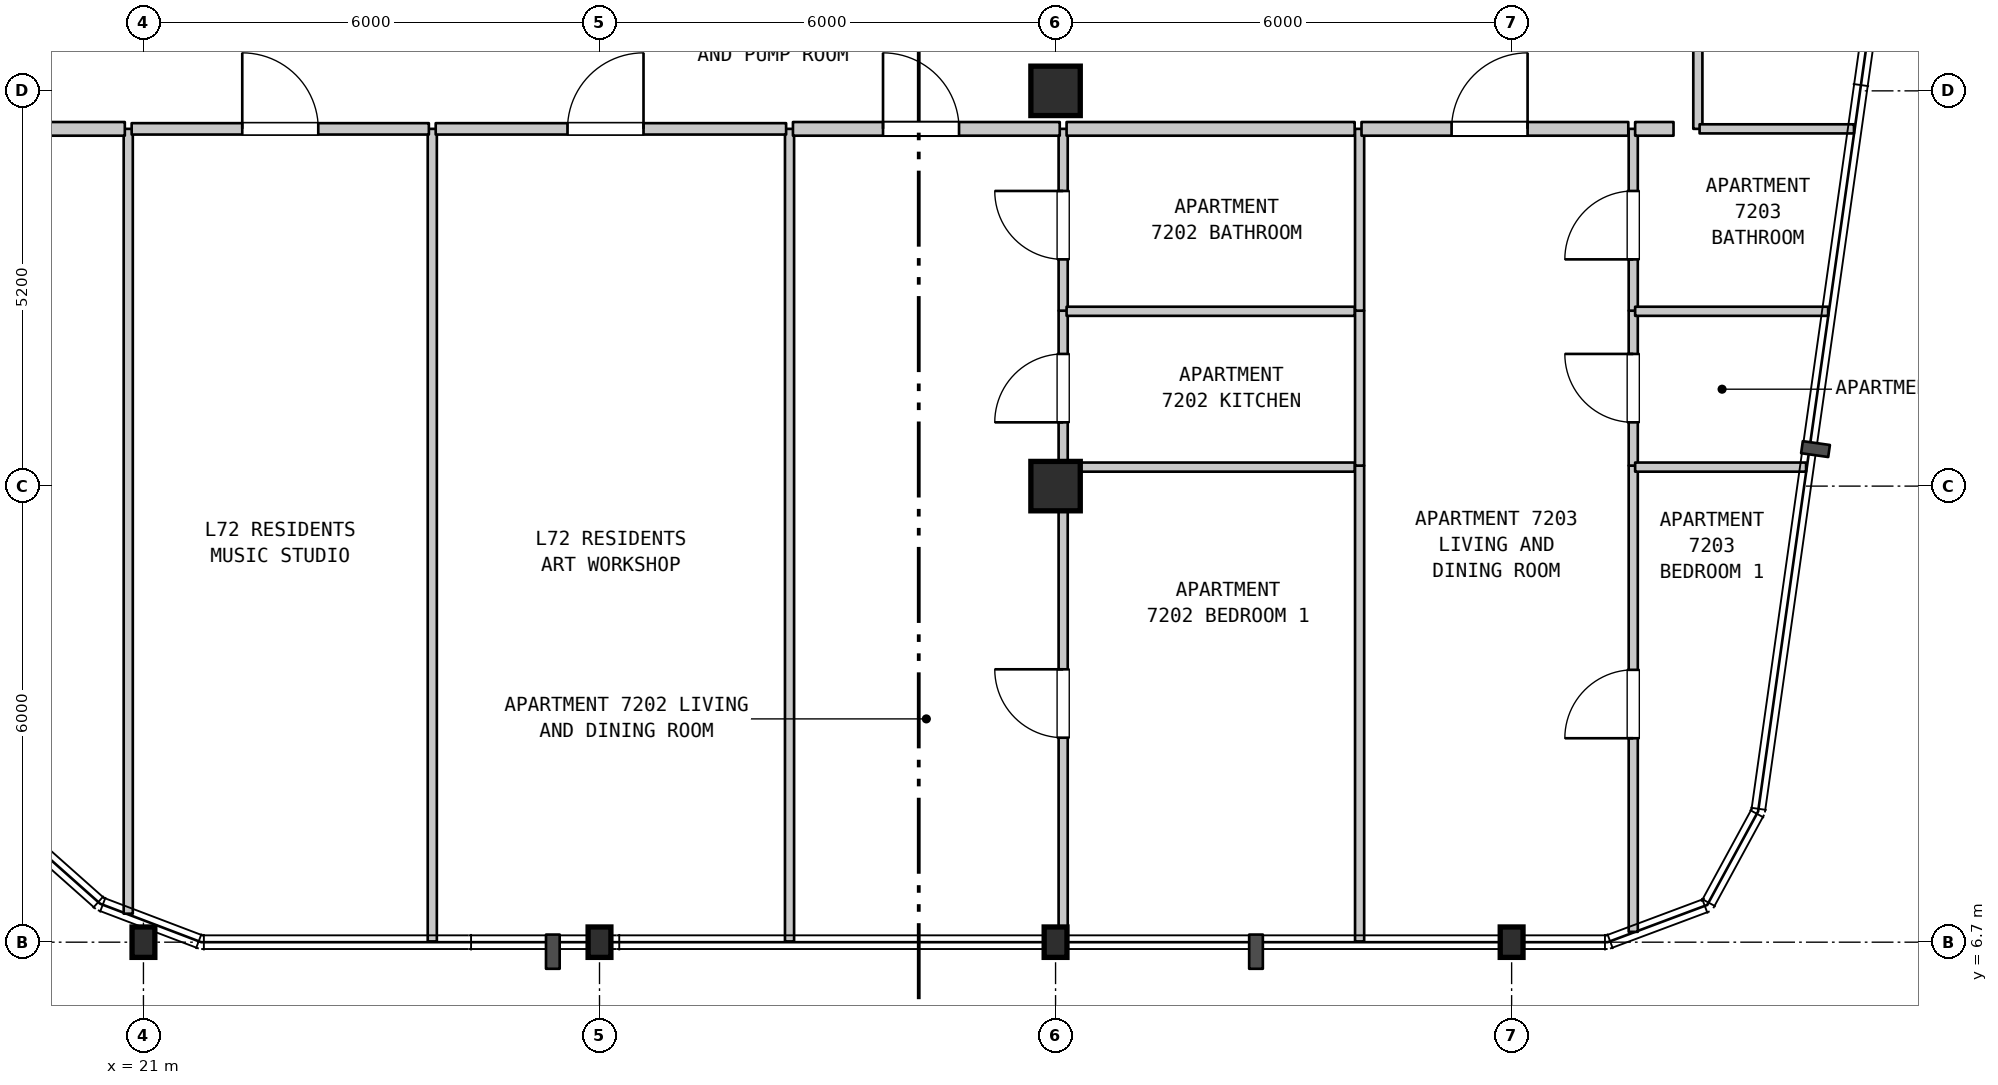
"""IFC4 building model, lengths in metres.
Left out: names, types, materials, properties, quantities, classifications, styles, units other than length and angle.
Written with IfcOpenShell. Run it as: python <this file> out.ifc"""

import sys

from ifc_helpers import new_model, si_unit, direction, frame, frame_2d, origin, origin_2d, place, context, subcontext, project, spatial, rectangle, i_section, extrude, element, fill, save


model = new_model("IFC4")
c1 = context("Model", 3, precision=1e-05, world=origin(), true_north=direction((0.0, 1.0)))
c2 = subcontext(c1, "Body", "Model", "MODEL_VIEW")
j1 = project(units=[si_unit("LENGTHUNIT", "METRE"), si_unit("PLANEANGLEUNIT", "RADIAN")], contexts=[c1])
p1 = place(None, origin())
s1 = spatial("IfcSite", under=j1, at=p1, CompositionType="ELEMENT")
p2 = place(p1, origin())
s2 = spatial("IfcBuilding", under=s1, at=p2, CompositionType="ELEMENT")
p3 = place(p2, frame((0.0, 0.0, 288.0)))
s3 = spatial("IfcBuildingStorey", under=s2, at=p3, CompositionType="ELEMENT", Elevation=288.0)
for number, where, z_axis, x_axis in (
    (1, (21.0, 6.7, 0.0), (0.0, 0.0, 1.0), (1.0, 0.0, 0.0)),
    (2, (27.0, 6.7, 0.0), (0.0, 0.0, 1.0), (1.0, 0.0, 0.0)),
    (3, (33.0, 6.7, 0.0), (0.0, 0.0, 1.0), (1.0, 0.0, 0.0)),
):
    element("IfcColumn", number, at=place(p3, frame(where, z_axis=z_axis, x_axis=x_axis)), inside=s3, PredefinedType="COLUMN", context=c2, shape_type="SweptSolid", body=[
        extrude(i_section(OverallWidth=0.3, OverallDepth=0.4, WebThickness=0.013, FlangeThickness=0.024, FilletRadius=0.027, at=origin_2d()), origin(), (0.0, 0.0, 1.0), 3.7),
    ])
for number, where, z_axis, x_axis in (
    (4, (33.0, 12.7, 0.0), (0.0, 0.0, 1.0), (1.0, 0.0, 0.0)),
    (5, (33.0, 17.9, 0.0), (0.0, 0.0, 1.0), (1.0, 0.0, 0.0)),
):
    element("IfcColumn", number, at=place(p3, frame(where, z_axis=z_axis, x_axis=x_axis)), inside=s3, PredefinedType="COLUMN", context=c2, shape_type="SweptSolid", body=[
        extrude(rectangle(XDim=0.65, YDim=0.65, at=origin_2d()), origin(), (0.0, 0.0, 1.0), 3.7),
    ])
p4 = place(p3, frame((39.0, 6.7, 0.0), z_axis=(0.0, 0.0, 1.0), x_axis=(1.0, 0.0, 0.0)))
e6 = element("IfcColumn", 6, at=p4, inside=s3, PredefinedType="COLUMN", context=c2, shape_type="SweptSolid", body=[
    extrude(i_section(OverallWidth=0.3, OverallDepth=0.4, WebThickness=0.013, FlangeThickness=0.024, FilletRadius=0.027, at=origin_2d()), origin(), (0.0, 0.0, 1.0), 3.7),
])
p5 = place(p3, frame((20.8, 7.075, 0.0), z_axis=(0.0, 0.0, 1.0), x_axis=(0.0, 1.0, 0.0)))
e7 = element("IfcWall", 7, at=p5, inside=s3, PredefinedType="PARTITIONING", context=c2, shape_type="SweptSolid", body=[
    extrude(rectangle(XDim=10.325, YDim=0.12, at=frame_2d((5.163, 0.0))), origin(), (0.0, 0.0, 1.0), 3.39),
])
for number, where, z_axis, x_axis in (
    (8, (24.8, 6.71, 0.0), (0.0, 0.0, 1.0), (0.0, 1.0, 0.0)),
    (9, (29.5, 6.71, 0.0), (0.0, 0.0, 1.0), (0.0, 1.0, 0.0)),
):
    element("IfcWall", number, at=place(p3, frame(where, z_axis=z_axis, x_axis=x_axis)), inside=s3, PredefinedType="PARTITIONING", context=c2, shape_type="SweptSolid", body=[
        extrude(rectangle(XDim=10.69, YDim=0.12, at=frame_2d((5.345, 0.0))), origin(), (0.0, 0.0, 1.0), 3.39),
    ])
p6 = place(p3, frame((33.1, 6.71, 0.0), z_axis=(0.0, 0.0, 1.0), x_axis=(0.0, 1.0, 0.0)))
e10 = element("IfcWall", 10, at=p6, inside=s3, PredefinedType="PARTITIONING", context=c2, shape_type="SweptSolid", body=[
    extrude(rectangle(XDim=6.26, YDim=0.12, at=frame_2d((3.13, 0.0))), origin(), (0.0, 0.0, 1.0), 3.1),
])
p7 = place(p6, frame((2.68, 0.0, 0.0)))
e11 = element("IfcOpeningElement", 11, at=p7, cuts=e10, PredefinedType="OPENING", context=c2, shape_type="SweptSolid", body=[
    extrude(rectangle(XDim=0.9, YDim=2.15, at=frame_2d((0.45, 1.075))), frame((0.0, 0.07, 0.0), z_axis=(0.0, -1.0, 0.0), x_axis=(1.0, 0.0, 0.0)), (0.0, 0.0, 1.0), 0.14),
])
p8 = place(p3, frame((33.1, 12.97, 0.0), z_axis=(0.0, 0.0, 1.0), x_axis=(0.0, 1.0, 0.0)))
e12 = element("IfcWall", 12, at=p8, inside=s3, PredefinedType="PARTITIONING", context=c2, shape_type="SweptSolid", body=[
    extrude(rectangle(XDim=2.038, YDim=0.12, at=frame_2d((1.019, 0.0))), origin(), (0.0, 0.0, 1.0), 3.1),
])
p9 = place(p8, frame((0.569, 0.0, 0.0)))
e13 = element("IfcOpeningElement", 13, at=p9, cuts=e12, PredefinedType="OPENING", context=c2, shape_type="SweptSolid", body=[
    extrude(rectangle(XDim=0.9, YDim=2.15, at=frame_2d((0.45, 1.075))), frame((0.0, 0.07, 0.0), z_axis=(0.0, -1.0, 0.0), x_axis=(1.0, 0.0, 0.0)), (0.0, 0.0, 1.0), 0.14),
])
p10 = place(p3, frame((33.1, 15.008, 0.0), z_axis=(0.0, 0.0, 1.0), x_axis=(0.0, 1.0, 0.0)))
e14 = element("IfcWall", 14, at=p10, inside=s3, PredefinedType="PARTITIONING", context=c2, shape_type="SweptSolid", body=[
    extrude(rectangle(XDim=2.392, YDim=0.12, at=frame_2d((1.196, 0.0))), origin(), (0.0, 0.0, 1.0), 3.1),
])
p11 = place(p10, frame((0.675, 0.0, 0.0)))
e15 = element("IfcOpeningElement", 15, at=p11, cuts=e14, PredefinedType="OPENING", context=c2, shape_type="SweptSolid", body=[
    extrude(rectangle(XDim=0.9, YDim=2.1, at=frame_2d((0.45, 1.05))), frame((0.0, 0.07, 0.0), z_axis=(0.0, -1.0, 0.0), x_axis=(1.0, 0.0, 0.0)), (0.0, 0.0, 1.0), 0.14),
])
p12 = place(p3, frame((37.0, 6.71, 0.0), z_axis=(0.0, 0.0, 1.0), x_axis=(0.0, 1.0, 0.0)))
e16 = element("IfcWall", 16, at=p12, inside=s3, PredefinedType="PARTITIONING", context=c2, shape_type="SweptSolid", body=[
    extrude(rectangle(XDim=6.26, YDim=0.12, at=frame_2d((3.13, 0.0))), origin(), (0.0, 0.0, 1.0), 3.39),
])
p13 = place(p3, frame((37.0, 12.97, 0.0), z_axis=(0.0, 0.0, 1.0), x_axis=(0.0, 1.0, 0.0)))
e17 = element("IfcWall", 17, at=p13, inside=s3, PredefinedType="PARTITIONING", context=c2, shape_type="SweptSolid", body=[
    extrude(rectangle(XDim=2.038, YDim=0.12, at=frame_2d((1.019, 0.0))), origin(), (0.0, 0.0, 1.0), 3.39),
])
p14 = place(p3, frame((37.0, 15.008, 0.0), z_axis=(0.0, 0.0, 1.0), x_axis=(0.0, 1.0, 0.0)))
e18 = element("IfcWall", 18, at=p14, inside=s3, PredefinedType="PARTITIONING", context=c2, shape_type="SweptSolid", body=[
    extrude(rectangle(XDim=2.392, YDim=0.12, at=frame_2d((1.196, 0.0))), origin(), (0.0, 0.0, 1.0), 3.39),
])
p15 = place(p3, frame((40.6, 6.836, 0.0), z_axis=(0.0, 0.0, 1.0), x_axis=(0.0, 1.0, 0.0)))
e19 = element("IfcWall", 19, at=p15, inside=s3, PredefinedType="PARTITIONING", context=c2, shape_type="SweptSolid", body=[
    extrude(rectangle(XDim=6.134, YDim=0.12, at=frame_2d((3.067, 0.0))), origin(), (0.0, 0.0, 1.0), 3.39),
])
p16 = place(p15, frame((2.547, 0.0, 0.0)))
e20 = element("IfcOpeningElement", 20, at=p16, cuts=e19, PredefinedType="OPENING", context=c2, shape_type="SweptSolid", body=[
    extrude(rectangle(XDim=0.9, YDim=2.15, at=frame_2d((0.45, 1.075))), frame((0.0, 0.07, 0.0), z_axis=(0.0, -1.0, 0.0), x_axis=(1.0, 0.0, 0.0)), (0.0, 0.0, 1.0), 0.14),
])
p17 = place(p3, frame((40.6, 12.97, 0.0), z_axis=(0.0, 0.0, 1.0), x_axis=(0.0, 1.0, 0.0)))
e21 = element("IfcWall", 21, at=p17, inside=s3, PredefinedType="PARTITIONING", context=c2, shape_type="SweptSolid", body=[
    extrude(rectangle(XDim=2.038, YDim=0.12, at=frame_2d((1.019, 0.0))), origin(), (0.0, 0.0, 1.0), 3.39),
])
p18 = place(p17, frame((0.569, 0.0, 0.0)))
e22 = element("IfcOpeningElement", 22, at=p18, cuts=e21, PredefinedType="OPENING", context=c2, shape_type="SweptSolid", body=[
    extrude(rectangle(XDim=0.9, YDim=2.15, at=frame_2d((0.45, 1.075))), frame((0.0, 0.07, 0.0), z_axis=(0.0, -1.0, 0.0), x_axis=(1.0, 0.0, 0.0)), (0.0, 0.0, 1.0), 0.14),
])
p19 = place(p3, frame((40.6, 15.008, 0.0), z_axis=(0.0, 0.0, 1.0), x_axis=(0.0, 1.0, 0.0)))
e23 = element("IfcWall", 23, at=p19, inside=s3, PredefinedType="PARTITIONING", context=c2, shape_type="SweptSolid", body=[
    extrude(rectangle(XDim=2.392, YDim=0.12, at=frame_2d((1.196, 0.0))), origin(), (0.0, 0.0, 1.0), 3.39),
])
p20 = place(p19, frame((0.675, 0.0, 0.0)))
e24 = element("IfcOpeningElement", 24, at=p20, cuts=e23, PredefinedType="OPENING", context=c2, shape_type="SweptSolid", body=[
    extrude(rectangle(XDim=0.9, YDim=2.1, at=frame_2d((0.45, 1.05))), frame((0.0, 0.07, 0.0), z_axis=(0.0, -1.0, 0.0), x_axis=(1.0, 0.0, 0.0)), (0.0, 0.0, 1.0), 0.14),
])
p21 = place(p3, frame((41.45, 17.4, 0.0), z_axis=(0.0, 0.0, 1.0), x_axis=(0.0, 1.0, 0.0)))
e25 = element("IfcWall", 25, at=p21, inside=s3, PredefinedType="PARTITIONING", context=c2, shape_type="SweptSolid", body=[
    extrude(rectangle(XDim=2.099, YDim=0.12, at=frame_2d((1.05, 0.0))), origin(), (0.0, 0.0, 1.0), 3.39),
])
p22 = place(p3, frame((33.145, 12.95, 0.0), z_axis=(0.0, 0.0, 1.0), x_axis=(1.0, 0.0, 0.0)))
e26 = element("IfcWall", 26, at=p22, inside=s3, PredefinedType="PARTITIONING", context=c2, shape_type="SweptSolid", body=[
    extrude(rectangle(XDim=3.79, YDim=0.12, at=frame_2d((1.895, 0.0))), origin(), (0.0, 0.0, 1.0), 3.39),
])
p23 = place(p3, frame((40.625, 12.95, 0.0), z_axis=(0.0, 0.0, 1.0), x_axis=(1.0, 0.0, 0.0)))
e27 = element("IfcWall", 27, at=p23, inside=s3, PredefinedType="PARTITIONING", context=c2, shape_type="SweptSolid", body=[
    extrude(rectangle(XDim=2.249, YDim=0.12, at=frame_2d((1.125, 0.0))), origin(), (0.0, 0.0, 1.0), 3.39),
])
p24 = place(p3, frame((33.145, 15.0, 0.0), z_axis=(0.0, 0.0, 1.0), x_axis=(1.0, 0.0, 0.0)))
e28 = element("IfcWall", 28, at=p24, inside=s3, PredefinedType="PARTITIONING", context=c2, shape_type="SweptSolid", body=[
    extrude(rectangle(XDim=3.79, YDim=0.12, at=frame_2d((1.895, 0.0))), origin(), (0.0, 0.0, 1.0), 3.39),
])
p25 = place(p3, frame((40.625, 15.0, 0.0), z_axis=(0.0, 0.0, 1.0), x_axis=(1.0, 0.0, 0.0)))
e29 = element("IfcWall", 29, at=p25, inside=s3, PredefinedType="PARTITIONING", context=c2, shape_type="SweptSolid", body=[
    extrude(rectangle(XDim=2.539, YDim=0.12, at=frame_2d((1.27, 0.0))), origin(), (0.0, 0.0, 1.0), 3.39),
])
p26 = place(p3, frame((18.895, 17.4, 0.0), z_axis=(0.0, 0.0, 1.0), x_axis=(1.0, 0.0, 0.0)))
e30 = element("IfcWall", 30, at=p26, inside=s3, PredefinedType="STANDARD", context=c2, shape_type="SweptSolid", body=[
    extrude(rectangle(XDim=1.86, YDim=0.18, at=frame_2d((0.93, 0.0))), origin(), (0.0, 0.0, 1.0), 3.39),
])
p27 = place(p3, frame((20.845, 17.4, 0.0), z_axis=(0.0, 0.0, 1.0), x_axis=(1.0, 0.0, 0.0)))
e31 = element("IfcWall", 31, at=p27, inside=s3, PredefinedType="STANDARD", context=c2, shape_type="SweptSolid", body=[
    extrude(rectangle(XDim=3.91, YDim=0.15, at=frame_2d((1.955, 0.0))), origin(), (0.0, 0.0, 1.0), 3.39),
])
p28 = place(p27, frame((1.455, 0.0, 0.0)))
e32 = element("IfcOpeningElement", 32, at=p28, cuts=e31, PredefinedType="OPENING", context=c2, shape_type="SweptSolid", body=[
    extrude(rectangle(XDim=1.0, YDim=2.15, at=frame_2d((0.5, 1.075))), frame((0.0, 0.085, 0.0), z_axis=(0.0, -1.0, 0.0), x_axis=(1.0, 0.0, 0.0)), (0.0, 0.0, 1.0), 0.17),
])
p29 = place(p3, frame((24.845, 17.4, 0.0), z_axis=(0.0, 0.0, 1.0), x_axis=(1.0, 0.0, 0.0)))
e33 = element("IfcWall", 33, at=p29, inside=s3, PredefinedType="STANDARD", context=c2, shape_type="SweptSolid", body=[
    extrude(rectangle(XDim=4.61, YDim=0.15, at=frame_2d((2.305, 0.0))), origin(), (0.0, 0.0, 1.0), 3.39),
])
p30 = place(p29, frame((1.734, 0.0, 0.0)))
e34 = element("IfcOpeningElement", 34, at=p30, cuts=e33, PredefinedType="OPENING", context=c2, shape_type="SweptSolid", body=[
    extrude(rectangle(XDim=1.0, YDim=2.15, at=frame_2d((0.5, 1.075))), frame((0.0, 0.085, 0.0), z_axis=(0.0, -1.0, 0.0), x_axis=(1.0, 0.0, 0.0)), (0.0, 0.0, 1.0), 0.17),
])
p31 = place(p3, frame((29.545, 17.4, 0.0), z_axis=(0.0, 0.0, 1.0), x_axis=(1.0, 0.0, 0.0)))
e35 = element("IfcWall", 35, at=p31, inside=s3, PredefinedType="STANDARD", context=c2, shape_type="SweptSolid", body=[
    extrude(rectangle(XDim=3.51, YDim=0.18, at=frame_2d((1.755, 0.0))), origin(), (0.0, 0.0, 1.0), 3.39),
])
p32 = place(p31, frame((1.185, 0.0, 0.0)))
e36 = element("IfcOpeningElement", 36, at=p32, cuts=e35, PredefinedType="OPENING", context=c2, shape_type="SweptSolid", body=[
    extrude(rectangle(XDim=1.0, YDim=2.15, at=frame_2d((0.5, 1.075))), frame((0.0, 0.1, 0.0), z_axis=(0.0, -1.0, 0.0), x_axis=(1.0, 0.0, 0.0)), (0.0, 0.0, 1.0), 0.2),
])
p33 = place(p3, frame((33.145, 17.4, 0.0), z_axis=(0.0, 0.0, 1.0), x_axis=(1.0, 0.0, 0.0)))
e37 = element("IfcWall", 37, at=p33, inside=s3, PredefinedType="STANDARD", context=c2, shape_type="SweptSolid", body=[
    extrude(rectangle(XDim=3.79, YDim=0.18, at=frame_2d((1.895, 0.0))), origin(), (0.0, 0.0, 1.0), 3.39),
])
p34 = place(p3, frame((37.025, 17.4, 0.0), z_axis=(0.0, 0.0, 1.0), x_axis=(1.0, 0.0, 0.0)))
e38 = element("IfcWall", 38, at=p34, inside=s3, PredefinedType="STANDARD", context=c2, shape_type="SweptSolid", body=[
    extrude(rectangle(XDim=3.51, YDim=0.18, at=frame_2d((1.755, 0.0))), origin(), (0.0, 0.0, 1.0), 3.39),
])
p35 = place(p34, frame((1.185, 0.0, 0.0)))
e39 = element("IfcOpeningElement", 39, at=p35, cuts=e38, PredefinedType="OPENING", context=c2, shape_type="SweptSolid", body=[
    extrude(rectangle(XDim=1.0, YDim=2.15, at=frame_2d((0.5, 1.075))), frame((0.0, 0.1, 0.0), z_axis=(0.0, -1.0, 0.0), x_axis=(1.0, 0.0, 0.0)), (0.0, 0.0, 1.0), 0.2),
])
p36 = place(p3, frame((40.625, 17.4, 0.0), z_axis=(0.0, 0.0, 1.0), x_axis=(1.0, 0.0, 0.0)))
e40 = element("IfcWall", 40, at=p36, inside=s3, PredefinedType="STANDARD", context=c2, shape_type="SweptSolid", body=[
    extrude(rectangle(XDim=0.505, YDim=0.18, at=frame_2d((0.252, 0.0))), origin(), (0.0, 0.0, 1.0), 3.39),
])
p37 = place(p3, frame((41.473, 17.4, 0.0), z_axis=(0.0, 0.0, 1.0), x_axis=(1.0, 0.0, 0.0)))
e41 = element("IfcWall", 41, at=p37, inside=s3, PredefinedType="PARTITIONING", context=c2, shape_type="SweptSolid", body=[
    extrude(rectangle(XDim=2.031, YDim=0.12, at=frame_2d((1.016, 0.0))), origin(), (0.0, 0.0, 1.0), 3.39),
])
p38 = place(p7, origin())
e42 = element("IfcDoor", 42, at=p38, inside=s3, OperationType="SINGLE_SWING_RIGHT", PredefinedType="DOOR", context=c2, shape_type="SweptSolid", body=[
    extrude(rectangle(XDim=0.9, YDim=2.15, at=frame_2d((0.45, 1.075))), frame((0.0, 0.025, 0.0), z_axis=(0.0, -1.0, 0.0), x_axis=(1.0, 0.0, 0.0)), (0.0, 0.0, 1.0), 0.05),
])
fill(e11, e42)
p39 = place(p9, origin())
e43 = element("IfcDoor", 43, at=p39, inside=s3, OperationType="SINGLE_SWING_LEFT", PredefinedType="DOOR", context=c2, shape_type="SweptSolid", body=[
    extrude(rectangle(XDim=0.9, YDim=2.15, at=frame_2d((0.45, 1.075))), frame((0.0, 0.025, 0.0), z_axis=(0.0, -1.0, 0.0), x_axis=(1.0, 0.0, 0.0)), (0.0, 0.0, 1.0), 0.05),
])
fill(e13, e43)
p40 = place(p11, origin())
e44 = element("IfcDoor", 44, at=p40, inside=s3, OperationType="SINGLE_SWING_RIGHT", PredefinedType="DOOR", context=c2, shape_type="SweptSolid", body=[
    extrude(rectangle(XDim=0.9, YDim=2.1, at=frame_2d((0.45, 1.05))), frame((0.0, 0.025, 0.0), z_axis=(0.0, -1.0, 0.0), x_axis=(1.0, 0.0, 0.0)), (0.0, 0.0, 1.0), 0.05),
])
fill(e15, e44)
p41 = place(p16, origin())
e45 = element("IfcDoor", 45, at=p41, inside=s3, OperationType="SINGLE_SWING_LEFT", PredefinedType="DOOR", context=c2, shape_type="SweptSolid", body=[
    extrude(rectangle(XDim=0.9, YDim=2.15, at=frame_2d((0.45, 1.075))), frame((0.0, 0.025, 0.0), z_axis=(0.0, -1.0, 0.0), x_axis=(1.0, 0.0, 0.0)), (0.0, 0.0, 1.0), 0.05),
])
fill(e20, e45)
p42 = place(p18, origin())
e46 = element("IfcDoor", 46, at=p42, inside=s3, OperationType="SINGLE_SWING_RIGHT", PredefinedType="DOOR", context=c2, shape_type="SweptSolid", body=[
    extrude(rectangle(XDim=0.9, YDim=2.15, at=frame_2d((0.45, 1.075))), frame((0.0, 0.025, 0.0), z_axis=(0.0, -1.0, 0.0), x_axis=(1.0, 0.0, 0.0)), (0.0, 0.0, 1.0), 0.05),
])
fill(e22, e46)
p43 = place(p20, origin())
e47 = element("IfcDoor", 47, at=p43, inside=s3, OperationType="SINGLE_SWING_LEFT", PredefinedType="DOOR", context=c2, shape_type="SweptSolid", body=[
    extrude(rectangle(XDim=0.9, YDim=2.1, at=frame_2d((0.45, 1.05))), frame((0.0, 0.025, 0.0), z_axis=(0.0, -1.0, 0.0), x_axis=(1.0, 0.0, 0.0)), (0.0, 0.0, 1.0), 0.05),
])
fill(e24, e47)
p44 = place(p28, origin())
e48 = element("IfcDoor", 48, at=p44, inside=s3, OperationType="SINGLE_SWING_LEFT", PredefinedType="DOOR", context=c2, shape_type="SweptSolid", body=[
    extrude(rectangle(XDim=1.0, YDim=2.15, at=frame_2d((0.5, 1.075))), frame((0.0, 0.025, 0.0), z_axis=(0.0, -1.0, 0.0), x_axis=(1.0, 0.0, 0.0)), (0.0, 0.0, 1.0), 0.05),
])
fill(e32, e48)
p45 = place(p30, origin())
e49 = element("IfcDoor", 49, at=p45, inside=s3, OperationType="SINGLE_SWING_RIGHT", PredefinedType="DOOR", context=c2, shape_type="SweptSolid", body=[
    extrude(rectangle(XDim=1.0, YDim=2.15, at=frame_2d((0.5, 1.075))), frame((0.0, 0.025, 0.0), z_axis=(0.0, -1.0, 0.0), x_axis=(1.0, 0.0, 0.0)), (0.0, 0.0, 1.0), 0.05),
])
fill(e34, e49)
p46 = place(p32, origin())
e50 = element("IfcDoor", 50, at=p46, inside=s3, OperationType="SINGLE_SWING_LEFT", PredefinedType="DOOR", context=c2, shape_type="SweptSolid", body=[
    extrude(rectangle(XDim=1.0, YDim=2.15, at=frame_2d((0.5, 1.075))), frame((0.0, 0.025, 0.0), z_axis=(0.0, -1.0, 0.0), x_axis=(1.0, 0.0, 0.0)), (0.0, 0.0, 1.0), 0.05),
])
fill(e36, e50)
p47 = place(p35, origin())
e51 = element("IfcDoor", 51, at=p47, inside=s3, OperationType="SINGLE_SWING_RIGHT", PredefinedType="DOOR", context=c2, shape_type="SweptSolid", body=[
    extrude(rectangle(XDim=1.0, YDim=2.15, at=frame_2d((0.5, 1.075))), frame((0.0, 0.025, 0.0), z_axis=(0.0, -1.0, 0.0), x_axis=(1.0, 0.0, 0.0)), (0.0, 0.0, 1.0), 0.05),
])
fill(e39, e51)
save(model, sys.argv[1])
